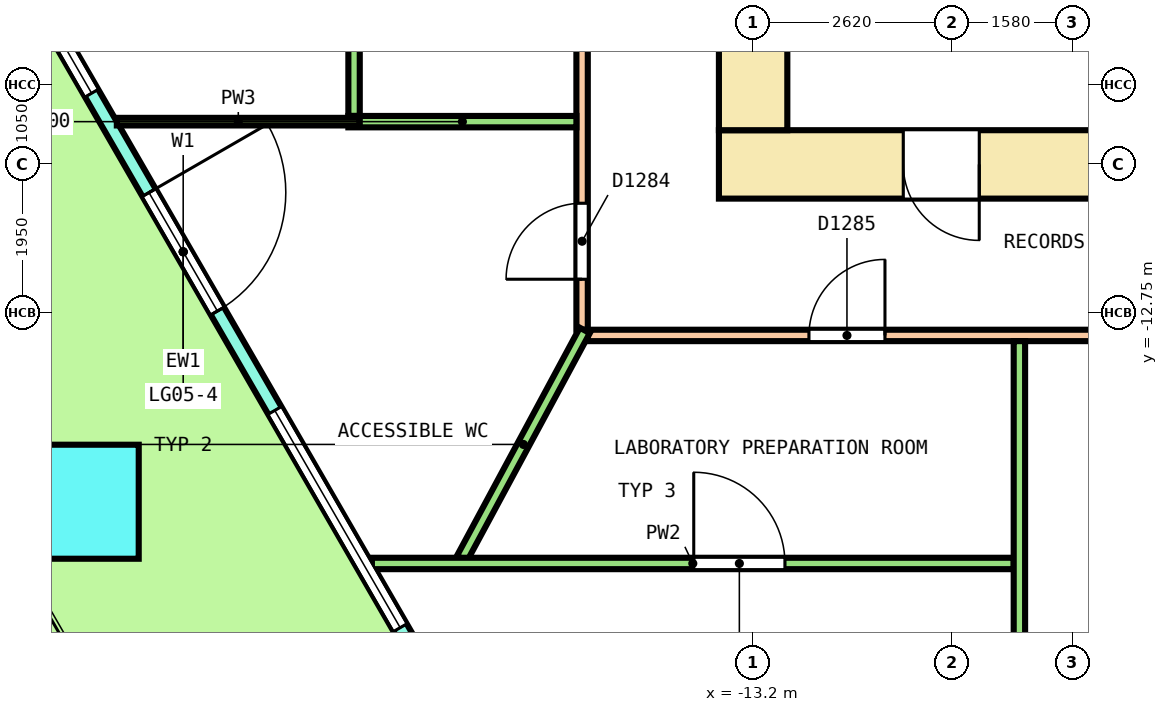
"""IFC4 building model, lengths in metres.
Left out: names, types, materials, properties, quantities, classifications, styles, units other than length and angle.
Written with IfcOpenShell. Run it as: python <this file> out.ifc"""

import sys

from ifc_helpers import new_model, si_unit, direction, frame, frame_2d, origin, origin_2d, place, context, subcontext, project, spatial, polyline, rectangle, outline, extrude, element, fill, save


model = new_model("IFC4")
c1 = context("Model", 3, precision=1e-05, world=origin(), true_north=direction((0.0, 1.0)))
c2 = subcontext(c1, "Body", "Model", "MODEL_VIEW")
j1 = project(units=[si_unit("LENGTHUNIT", "METRE"), si_unit("PLANEANGLEUNIT", "RADIAN")], contexts=[c1])
p1 = place(None, origin())
s1 = spatial("IfcSite", under=j1, at=p1, CompositionType="ELEMENT")
p2 = place(p1, origin())
s2 = spatial("IfcBuilding", under=s1, at=p2, CompositionType="ELEMENT")
p3 = place(p2, frame((0.0, 0.0, 23.4)))
s3 = spatial("IfcBuildingStorey", under=s2, at=p3, CompositionType="ELEMENT", Elevation=23.4)
p4 = place(p3, frame((-22.033, -15.238, 0.0), z_axis=(0.003616759812, -0.006269050341, 0.999973808685), x_axis=(0.499535500447, -0.866263182786, -0.007237536985)))
e1 = element("IfcColumn", 1, at=p4, inside=s3, PredefinedType="COLUMN", context=c2, shape_type="SweptSolid", body=[
    extrude(rectangle(XDim=1.5, YDim=1.5, at=origin_2d()), origin(), (0.0, 0.0, 1.0), 4.05),
])
p5 = place(p3, frame((-25.772, -3.161, 0.0), z_axis=(0.0, 0.0, 1.0), x_axis=(0.500001833672, -0.866024345111, 0.0)))
e2 = element("IfcWall", 2, at=p5, inside=s3, PredefinedType="SOLIDWALL", context=c2, shape_type="SweptSolid", body=[
    extrude(outline(polyline([(-0.027, -0.1), (0.991, -0.1), (2.008, -0.1), (3.026, -0.1), (4.043, -0.1), (5.061, -0.1), (6.079, -0.1), (7.096, -0.1), (8.114, -0.1), (9.131, -0.1), (10.149, -0.1), (11.167, -0.1), (12.184, -0.1), (13.202, -0.1), (14.219, -0.1), (15.237, -0.1), (16.254, -0.1), (17.272, -0.1), (18.29, -0.1), (19.307, -0.1), (20.325, -0.1), (20.271, 0.1), (19.259, 0.1), (18.247, 0.1), (17.234, 0.1), (16.222, 0.1), (15.21, 0.1), (14.198, 0.1), (13.186, 0.1), (12.173, 0.1), (11.161, 0.1), (10.149, 0.1), (9.137, 0.1), (8.125, 0.1), (7.112, 0.1), (6.1, 0.1), (5.088, 0.1), (4.076, 0.1), (3.063, 0.1), (2.051, 0.1), (1.039, 0.1), (0.027, 0.1), (-0.027, -0.1)])), origin(), (0.0, 0.0, 1.0), 4.1),
])
p6 = place(p5, frame((0.38, 0.0, 0.1)))
e3 = element("IfcOpeningElement", 3, at=p6, cuts=e2, PredefinedType="OPENING", context=c2, shape_type="SweptSolid", body=[
    extrude(rectangle(XDim=3.3, YDim=2.9, at=frame_2d((1.65, 1.45))), frame((0.0, 0.11, 0.0), z_axis=(0.0, -1.0, 0.0), x_axis=(1.0, 0.0, 0.0)), (0.0, 0.0, 1.0), 0.22),
])
p7 = place(p5, frame((4.439, 0.0, 0.1)))
e4 = element("IfcOpeningElement", 4, at=p7, cuts=e2, PredefinedType="OPENING", context=c2, shape_type="SweptSolid", body=[
    extrude(rectangle(XDim=3.3, YDim=2.9, at=frame_2d((1.65, 1.45))), frame((0.0, 0.11, 0.0), z_axis=(0.0, -1.0, 0.0), x_axis=(1.0, 0.0, 0.0)), (0.0, 0.0, 1.0), 0.22),
])
p8 = place(p5, frame((9.249, 0.0, 0.0)))
e5 = element("IfcOpeningElement", 5, at=p8, cuts=e2, PredefinedType="OPENING", context=c2, shape_type="SweptSolid", body=[
    extrude(rectangle(XDim=1.8, YDim=2.4, at=frame_2d((0.9, 1.2))), frame((0.0, 0.11, 0.0), z_axis=(0.0, -1.0, 0.0), x_axis=(1.0, 0.0, 0.0)), (0.0, 0.0, 1.0), 0.22),
])
p9 = place(p5, frame((9.249, 0.0, 2.55)))
e6 = element("IfcOpeningElement", 6, at=p9, cuts=e2, PredefinedType="OPENING", context=c2, shape_type="SweptSolid", body=[
    extrude(rectangle(XDim=1.8, YDim=0.45, at=frame_2d((0.9, 0.225))), frame((0.0, 0.11, 0.0), z_axis=(0.0, -1.0, 0.0), x_axis=(1.0, 0.0, 0.0)), (0.0, 0.0, 1.0), 0.22),
])
p10 = place(p5, frame((12.559, 0.0, 0.1)))
e7 = element("IfcOpeningElement", 7, at=p10, cuts=e2, PredefinedType="OPENING", context=c2, shape_type="SweptSolid", body=[
    extrude(rectangle(XDim=3.3, YDim=2.9, at=frame_2d((1.65, 1.45))), frame((0.0, 0.11, 0.0), z_axis=(0.0, -1.0, 0.0), x_axis=(1.0, 0.0, 0.0)), (0.0, 0.0, 1.0), 0.22),
])
p11 = place(p5, frame((16.618, 0.0, 0.1)))
e8 = element("IfcOpeningElement", 8, at=p11, cuts=e2, PredefinedType="OPENING", context=c2, shape_type="SweptSolid", body=[
    extrude(rectangle(XDim=3.3, YDim=2.9, at=frame_2d((1.65, 1.45))), frame((0.0, 0.11, 0.0), z_axis=(0.0, -1.0, 0.0), x_axis=(1.0, 0.0, 0.0)), (0.0, 0.0, 1.0), 0.22),
])
p12 = place(p3, frame((-13.65, -10.8, 0.0), z_axis=(0.0, 0.0, 1.0), x_axis=(1.0, 0.0, 0.0)))
e9 = element("IfcWall", 9, at=p12, inside=s3, PredefinedType="SHEAR", context=c2, shape_type="SweptSolid", body=[
    extrude(rectangle(XDim=27.3, YDim=0.9, at=frame_2d((13.65, 0.0))), origin(), (0.0, 0.0, 1.0), 4.1),
])
p13 = place(p12, frame((2.425, 0.0, 0.0)))
e10 = element("IfcOpeningElement", 10, at=p13, cuts=e9, PredefinedType="OPENING", context=c2, shape_type="SweptSolid", body=[
    extrude(rectangle(XDim=1.0, YDim=2.1, at=frame_2d((0.5, 1.05))), frame((0.0, 0.46, 0.0), z_axis=(0.0, -1.0, 0.0), x_axis=(1.0, 0.0, 0.0)), (0.0, 0.0, 1.0), 0.92),
])
p14 = place(p12, frame((6.569, 0.0, 0.0)))
e11 = element("IfcOpeningElement", 11, at=p14, cuts=e9, PredefinedType="OPENING", context=c2, shape_type="SweptSolid", body=[
    extrude(rectangle(XDim=1.0, YDim=2.1, at=frame_2d((0.5, 1.05))), frame((0.0, 0.46, 0.0), z_axis=(0.0, -1.0, 0.0), x_axis=(1.0, 0.0, 0.0)), (0.0, 0.0, 1.0), 0.92),
])
p15 = place(p12, frame((10.681, 0.0, 0.0)))
e12 = element("IfcOpeningElement", 12, at=p15, cuts=e9, PredefinedType="OPENING", context=c2, shape_type="SweptSolid", body=[
    extrude(rectangle(XDim=1.0, YDim=2.1, at=frame_2d((0.5, 1.05))), frame((0.0, 0.46, 0.0), z_axis=(0.0, -1.0, 0.0), x_axis=(1.0, 0.0, 0.0)), (0.0, 0.0, 1.0), 0.92),
])
p16 = place(p12, frame((19.202, 0.0, 0.0)))
e13 = element("IfcOpeningElement", 13, at=p16, cuts=e9, PredefinedType="OPENING", context=c2, shape_type="SweptSolid", body=[
    extrude(rectangle(XDim=1.0, YDim=2.1, at=frame_2d((0.5, 1.05))), frame((0.0, 0.46, 0.0), z_axis=(0.0, -1.0, 0.0), x_axis=(1.0, 0.0, 0.0)), (0.0, 0.0, 1.0), 0.92),
])
p17 = place(p12, frame((21.881, 0.0, 0.0)))
e14 = element("IfcOpeningElement", 14, at=p17, cuts=e9, PredefinedType="OPENING", context=c2, shape_type="SweptSolid", body=[
    extrude(rectangle(XDim=1.0, YDim=2.1, at=frame_2d((0.5, 1.05))), frame((0.0, 0.46, 0.0), z_axis=(0.0, -1.0, 0.0), x_axis=(1.0, 0.0, 0.0)), (0.0, 0.0, 1.0), 0.92),
])
p18 = place(p12, frame((24.592, 0.0, 0.0)))
e15 = element("IfcOpeningElement", 15, at=p18, cuts=e9, PredefinedType="OPENING", context=c2, shape_type="SweptSolid", body=[
    extrude(rectangle(XDim=1.0, YDim=2.1, at=frame_2d((0.5, 1.05))), frame((0.0, 0.46, 0.0), z_axis=(0.0, -1.0, 0.0), x_axis=(1.0, 0.0, 0.0)), (0.0, 0.0, 1.0), 0.92),
])
p19 = place(p12, frame((15.2, 0.0, 0.0)))
e16 = element("IfcOpeningElement", 16, at=p19, cuts=e9, PredefinedType="OPENING", context=c2, shape_type="SweptSolid", body=[
    extrude(rectangle(XDim=1.2, YDim=2.1, at=frame_2d((0.6, 1.05))), frame((0.0, 0.46, 0.0), z_axis=(0.0, -1.0, 0.0), x_axis=(1.0, 0.0, 0.0)), (0.0, 0.0, 1.0), 0.92),
])
p20 = place(p3, frame((-13.2, -10.35, 0.0), z_axis=(0.0, 0.0, 1.0), x_axis=(0.0, 1.0, 0.0)))
e17 = element("IfcWall", 17, at=p20, inside=s3, PredefinedType="SHEAR", context=c2, shape_type="SweptSolid", body=[
    extrude(rectangle(XDim=20.7, YDim=0.9, at=frame_2d((10.35, 0.0))), origin(), (0.0, 0.0, 1.0), 4.1),
])
p21 = place(p20, frame((9.15, 0.0, 0.0)))
e18 = element("IfcOpeningElement", 18, at=p21, cuts=e17, PredefinedType="OPENING", context=c2, shape_type="SweptSolid", body=[
    extrude(rectangle(XDim=2.4, YDim=2.1, at=frame_2d((1.2, 1.05))), frame((0.0, 0.46, 0.0), z_axis=(0.0, -1.0, 0.0), x_axis=(1.0, 0.0, 0.0)), (0.0, 0.0, 1.0), 0.92),
])
p22 = place(p20, frame((16.05, 0.0, 0.0)))
e19 = element("IfcOpeningElement", 19, at=p22, cuts=e17, PredefinedType="OPENING", context=c2, shape_type="SweptSolid", body=[
    extrude(rectangle(XDim=1.2, YDim=2.1, at=frame_2d((0.6, 1.05))), frame((0.0, 0.46, 0.0), z_axis=(0.0, -1.0, 0.0), x_axis=(1.0, 0.0, 0.0)), (0.0, 0.0, 1.0), 0.92),
])
p23 = place(p20, frame((3.45, 0.0, 0.0)))
e20 = element("IfcOpeningElement", 20, at=p23, cuts=e17, PredefinedType="OPENING", context=c2, shape_type="SweptSolid", body=[
    extrude(rectangle(XDim=1.2, YDim=2.1, at=frame_2d((0.6, 1.05))), frame((0.0, 0.46, 0.0), z_axis=(0.0, -1.0, 0.0), x_axis=(1.0, 0.0, 0.0)), (0.0, 0.0, 1.0), 0.92),
])
p24 = place(p3, frame((-15.45, -12.975, 0.0), z_axis=(0.0, 0.0, 1.0), x_axis=(0.0, 1.0, 0.0)))
e21 = element("IfcWall", 21, at=p24, inside=s3, PredefinedType="PARTITIONING", context=c2, shape_type="SweptSolid", body=[
    extrude(rectangle(XDim=25.975, YDim=0.15, at=frame_2d((12.988, 0.0))), origin(), (0.0, 0.0, 1.0), 3.05),
])
p25 = place(p24, frame((24.452, 0.0, 0.0)))
e22 = element("IfcOpeningElement", 22, at=p25, cuts=e21, PredefinedType="OPENING", context=c2, shape_type="SweptSolid", body=[
    extrude(rectangle(XDim=1.0, YDim=2.1, at=frame_2d((0.5, 1.05))), frame((0.0, 0.085, 0.0), z_axis=(0.0, -1.0, 0.0), x_axis=(1.0, 0.0, 0.0)), (0.0, 0.0, 1.0), 0.17),
])
p26 = place(p24, frame((15.722, 0.0, 0.0)))
e23 = element("IfcOpeningElement", 23, at=p26, cuts=e21, PredefinedType="OPENING", context=c2, shape_type="SweptSolid", body=[
    extrude(rectangle(XDim=1.0, YDim=2.1, at=frame_2d((0.5, 1.05))), frame((0.0, 0.085, 0.0), z_axis=(0.0, -1.0, 0.0), x_axis=(1.0, 0.0, 0.0)), (0.0, 0.0, 1.0), 0.17),
])
p27 = place(p24, frame((7.494, 0.0, 0.0)))
e24 = element("IfcOpeningElement", 24, at=p27, cuts=e21, PredefinedType="OPENING", context=c2, shape_type="SweptSolid", body=[
    extrude(rectangle(XDim=1.0, YDim=2.1, at=frame_2d((0.5, 1.05))), frame((0.0, 0.085, 0.0), z_axis=(0.0, -1.0, 0.0), x_axis=(1.0, 0.0, 0.0)), (0.0, 0.0, 1.0), 0.17),
])
p28 = place(p24, frame((0.664, 0.0, 0.0)))
e25 = element("IfcOpeningElement", 25, at=p28, cuts=e21, PredefinedType="OPENING", context=c2, shape_type="SweptSolid", body=[
    extrude(rectangle(XDim=1.0, YDim=2.1, at=frame_2d((0.5, 1.05))), frame((0.0, 0.085, 0.0), z_axis=(0.0, -1.0, 0.0), x_axis=(1.0, 0.0, 0.0)), (0.0, 0.0, 1.0), 0.17),
])
p29 = place(p3, frame((-15.375, -13.05, 0.0), z_axis=(0.0, 0.0, 1.0), x_axis=(1.0, 0.0, 0.0)))
e26 = element("IfcWall", 26, at=p29, inside=s3, PredefinedType="PARTITIONING", context=c2, shape_type="SweptSolid", body=[
    extrude(rectangle(XDim=30.75, YDim=0.15, at=frame_2d((15.375, 0.0))), origin(), (0.0, 0.0, 1.0), 3.05),
])
p30 = place(p29, frame((2.91, 0.0, 0.0)))
e27 = element("IfcOpeningElement", 27, at=p30, cuts=e26, PredefinedType="OPENING", context=c2, shape_type="SweptSolid", body=[
    extrude(rectangle(XDim=1.0, YDim=2.1, at=frame_2d((0.5, 1.05))), frame((0.0, 0.085, 0.0), z_axis=(0.0, -1.0, 0.0), x_axis=(1.0, 0.0, 0.0)), (0.0, 0.0, 1.0), 0.17),
])
p31 = place(p29, frame((13.33, 0.0, 0.0)))
e28 = element("IfcOpeningElement", 28, at=p31, cuts=e26, PredefinedType="OPENING", context=c2, shape_type="SweptSolid", body=[
    extrude(rectangle(XDim=1.2, YDim=2.1, at=frame_2d((0.6, 1.05))), frame((0.0, 0.085, 0.0), z_axis=(0.0, -1.0, 0.0), x_axis=(1.0, 0.0, 0.0)), (0.0, 0.0, 1.0), 0.17),
])
p32 = place(p29, frame((23.47, 0.0, 0.0)))
e29 = element("IfcOpeningElement", 29, at=p32, cuts=e26, PredefinedType="OPENING", context=c2, shape_type="SweptSolid", body=[
    extrude(rectangle(XDim=1.2, YDim=2.1, at=frame_2d((0.6, 1.05))), frame((0.0, 0.085, 0.0), z_axis=(0.0, -1.0, 0.0), x_axis=(1.0, 0.0, 0.0)), (0.0, 0.0, 1.0), 0.17),
])
p33 = place(p3, frame((-18.45, -10.163, 0.0), z_axis=(0.0, 0.0, 1.0), x_axis=(0.0, 1.0, 0.0)))
e30 = element("IfcWall", 30, at=p33, inside=s3, PredefinedType="PARTITIONING", context=c2, shape_type="SweptSolid", body=[
    extrude(rectangle(XDim=10.389, YDim=0.15, at=frame_2d((5.195, 0.0))), origin(), (0.0, 0.0, 1.0), 3.05),
])
p34 = place(p3, frame((-18.525, -10.238, 0.0), z_axis=(0.0, 0.0, 1.0), x_axis=(1.0, 0.0, 0.0)))
e31 = element("IfcWall", 31, at=p34, inside=s3, PredefinedType="PARTITIONING", context=c2, shape_type="SweptSolid", body=[
    extrude(rectangle(XDim=3.0, YDim=0.15, at=frame_2d((1.5, 0.0))), origin(), (0.0, 0.0, 1.0), 4.1),
])
p35 = place(p3, frame((-17.03, -15.984, 0.0), z_axis=(0.0, 0.0, 1.0), x_axis=(0.47412118702, 0.880459595904, 0.0)))
e32 = element("IfcWall", 32, at=p35, inside=s3, PredefinedType="PARTITIONING", context=c2, shape_type="SweptSolid", body=[
    extrude(rectangle(XDim=3.407, YDim=0.15, at=frame_2d((1.704, 0.0))), origin(), (0.0, 0.0, 1.0), 4.1),
])
p36 = place(p3, frame((-18.215, -16.05, 0.0), z_axis=(0.0, 0.0, 1.0), x_axis=(1.0, 0.0, 0.0)))
e33 = element("IfcWall", 33, at=p36, inside=s3, PredefinedType="PARTITIONING", context=c2, shape_type="SweptSolid", body=[
    extrude(rectangle(XDim=8.444, YDim=0.15, at=frame_2d((4.222, 0.0))), origin(), (0.0, 0.0, 1.0), 3.05),
])
p37 = place(p36, frame((4.234, 0.0, 0.0)))
e34 = element("IfcOpeningElement", 34, at=p37, cuts=e33, PredefinedType="OPENING", context=c2, shape_type="SweptSolid", body=[
    extrude(rectangle(XDim=1.2, YDim=2.1, at=frame_2d((0.6, 1.05))), frame((0.0, 0.085, 0.0), z_axis=(0.0, -1.0, 0.0), x_axis=(1.0, 0.0, 0.0)), (0.0, 0.0, 1.0), 0.17),
])
p38 = place(p3, frame((-9.697, -24.046, 0.0), z_axis=(0.0, 0.0, 1.0), x_axis=(0.0, 1.0, 0.0)))
e35 = element("IfcWall", 35, at=p38, inside=s3, PredefinedType="PARTITIONING", context=c2, shape_type="SweptSolid", body=[
    extrude(rectangle(XDim=10.921, YDim=0.15, at=frame_2d((5.46, 0.0))), origin(), (0.0, 0.0, 1.0), 3.05),
])
p39 = place(p3, frame((-21.571, -10.238, 0.0), z_axis=(0.0, 0.0, 1.0), x_axis=(1.0, 0.0, 0.0)))
e36 = element("IfcWall", 36, at=p39, inside=s3, PredefinedType="PARTITIONING", context=c2, shape_type="SweptSolid", body=[
    extrude(rectangle(XDim=3.196, YDim=0.1, at=frame_2d((1.598, 0.0))), origin(), (0.0, 0.0, 1.0), 3.05),
])
p40 = place(p7, origin())
e37 = element("IfcWindow", 37, at=p40, inside=s3, PartitioningType="SINGLE_PANEL", PredefinedType="WINDOW", context=c2, shape_type="SweptSolid", body=[
    extrude(rectangle(XDim=3.3, YDim=2.9, at=frame_2d((1.65, 1.45))), frame((0.0, 0.03, 0.0), z_axis=(0.0, -1.0, 0.0), x_axis=(1.0, 0.0, 0.0)), (0.0, 0.0, 1.0), 0.06),
])
fill(e4, e37)
p41 = place(p8, origin())
e38 = element("IfcDoor", 38, at=p41, inside=s3, OperationType="DOUBLE_DOOR_SINGLE_SWING", PredefinedType="DOOR", context=c2, shape_type="SweptSolid", body=[
    extrude(rectangle(XDim=1.8, YDim=2.4, at=frame_2d((0.9, 1.2))), frame((0.0, 0.025, 0.0), z_axis=(0.0, -1.0, 0.0), x_axis=(1.0, 0.0, 0.0)), (0.0, 0.0, 1.0), 0.05),
])
fill(e5, e38)
p42 = place(p9, origin())
e39 = element("IfcWindow", 39, at=p42, inside=s3, PartitioningType="SINGLE_PANEL", PredefinedType="WINDOW", context=c2, shape_type="SweptSolid", body=[
    extrude(rectangle(XDim=1.8, YDim=0.45, at=frame_2d((0.9, 0.225))), frame((0.0, 0.03, 0.0), z_axis=(0.0, -1.0, 0.0), x_axis=(1.0, 0.0, 0.0)), (0.0, 0.0, 1.0), 0.06),
])
fill(e6, e39)
p43 = place(p10, origin())
e40 = element("IfcWindow", 40, at=p43, inside=s3, PartitioningType="SINGLE_PANEL", PredefinedType="WINDOW", context=c2, shape_type="SweptSolid", body=[
    extrude(rectangle(XDim=3.3, YDim=2.9, at=frame_2d((1.65, 1.45))), frame((0.0, 0.03, 0.0), z_axis=(0.0, -1.0, 0.0), x_axis=(1.0, 0.0, 0.0)), (0.0, 0.0, 1.0), 0.06),
])
fill(e7, e40)
p44 = place(p13, origin())
e41 = element("IfcDoor", 41, at=p44, inside=s3, OperationType="SINGLE_SWING_LEFT", PredefinedType="DOOR", context=c2, shape_type="SweptSolid", body=[
    extrude(rectangle(XDim=1.0, YDim=2.1, at=frame_2d((0.5, 1.05))), frame((0.0, 0.3, 0.0), z_axis=(0.0, -1.0, 0.0), x_axis=(1.0, 0.0, 0.0)), (0.0, 0.0, 1.0), 0.6),
])
fill(e10, e41)
p45 = place(p28, origin())
e42 = element("IfcDoor", 42, at=p45, inside=s3, OperationType="SINGLE_SWING_LEFT", PredefinedType="DOOR", context=c2, shape_type="SweptSolid", body=[
    extrude(rectangle(XDim=1.0, YDim=2.1, at=frame_2d((0.5, 1.05))), frame((0.0, 0.025, 0.0), z_axis=(0.0, -1.0, 0.0), x_axis=(1.0, 0.0, 0.0)), (0.0, 0.0, 1.0), 0.05),
])
fill(e25, e42)
p46 = place(p30, origin())
e43 = element("IfcDoor", 43, at=p46, inside=s3, OperationType="SINGLE_SWING_RIGHT", PredefinedType="DOOR", context=c2, shape_type="SweptSolid", body=[
    extrude(rectangle(XDim=1.0, YDim=2.1, at=frame_2d((0.5, 1.05))), frame((0.0, 0.025, 0.0), z_axis=(0.0, -1.0, 0.0), x_axis=(1.0, 0.0, 0.0)), (0.0, 0.0, 1.0), 0.05),
])
fill(e27, e43)
p47 = place(p37, origin())
e44 = element("IfcDoor", 44, at=p47, inside=s3, OperationType="DOUBLE_DOOR_SINGLE_SWING", PredefinedType="DOOR", context=c2, shape_type="SweptSolid", body=[
    extrude(rectangle(XDim=1.2, YDim=2.1, at=frame_2d((0.6, 1.05))), frame((0.0, 0.025, 0.0), z_axis=(0.0, -1.0, 0.0), x_axis=(1.0, 0.0, 0.0)), (0.0, 0.0, 1.0), 0.05),
])
fill(e34, e44)
save(model, sys.argv[1])
